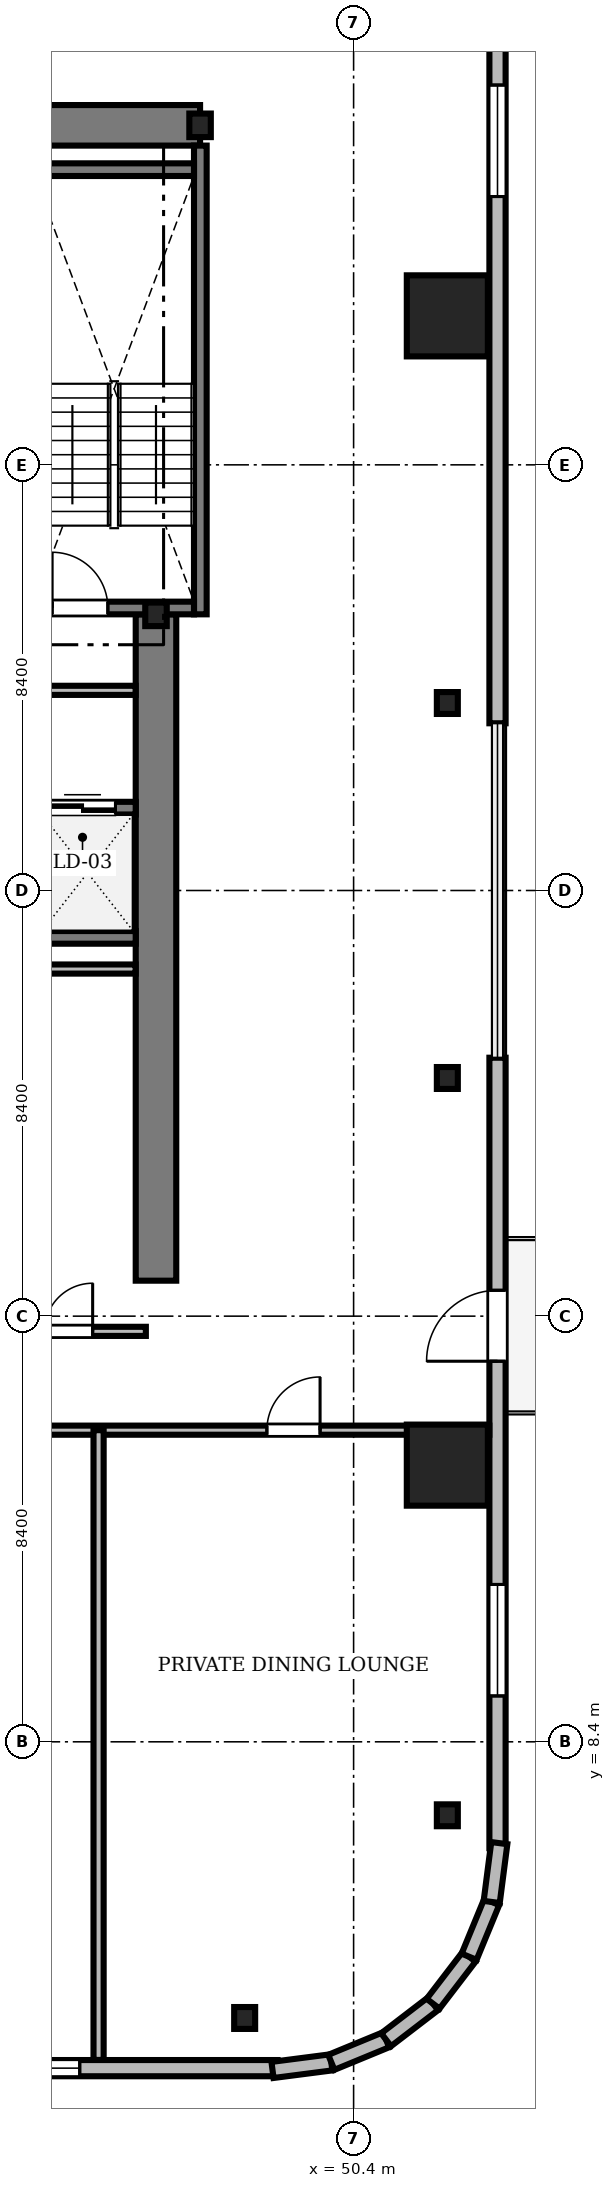
"""IFC4 building model, lengths in metres.
Left out: names, types, materials, properties, quantities, classifications, styles, units other than length and angle.
Written with IfcOpenShell. Run it as: python <this file> out.ifc"""

import sys

from ifc_helpers import new_model, si_unit, direction, frame, frame_2d, origin, origin_2d, place, context, subcontext, project, spatial, rectangle, i_section, extrude, source, transform, mapped, element, fill, save


model = new_model("IFC4")
c1 = context("Model", 3, precision=1e-05, world=origin(), true_north=direction((0.0, 1.0)))
c2 = subcontext(c1, "Body", "Model", "MODEL_VIEW")
j1 = project(units=[si_unit("LENGTHUNIT", "METRE"), si_unit("PLANEANGLEUNIT", "RADIAN")], contexts=[c1])
p1 = place(None, origin())
s1 = spatial("IfcSite", under=j1, at=p1, CompositionType="ELEMENT")
p2 = place(p1, origin())
s2 = spatial("IfcBuilding", under=s1, at=p2, CompositionType="ELEMENT")
p3 = place(p2, frame((0.0, 0.0, 144.6)))
s3 = spatial("IfcBuildingStorey", under=s2, at=p3, CompositionType="ELEMENT", Elevation=144.6)
m1 = source(origin(), c2, "Body", "SweptSolid", [
    extrude(rectangle(XDim=17.52, YDim=0.8, at=frame_2d((8.76, 0.0))), origin(), (0.0, 0.0, 1.0), 3.46),
])
p4 = place(p3, frame((29.85, 40.3, 0.0), z_axis=(0.0, 0.0, 1.0), x_axis=(1.0, 0.0, 0.0)))
e1 = element("IfcWall", 1, at=p4, inside=s3, PredefinedType="SHEAR", context=c2, shape_type="MappedRepresentation", body=[
    mapped(m1, transform((0.0, 0.0, 0.0), scale=1.0)),
])
m2 = source(origin(), c2, "Body", "SweptSolid", [
    extrude(rectangle(XDim=13.15, YDim=0.8, at=frame_2d((6.575, 0.0))), origin(), (0.0, 0.0, 1.0), 3.46),
])
p5 = place(p3, frame((46.5, 17.5, 0.0), z_axis=(0.0, 0.0, 1.0), x_axis=(0.0, 1.0, 0.0)))
e2 = element("IfcWall", 2, at=p5, inside=s3, PredefinedType="SHEAR", context=c2, shape_type="MappedRepresentation", body=[
    mapped(m2, transform((0.0, 0.0, 0.0), scale=1.0)),
])
m3 = source(origin(), c2, "Body", "SweptSolid", [
    extrude(i_section(OverallWidth=0.424, OverallDepth=0.465, WebThickness=0.035, FlangeThickness=0.056, FilletRadius=0.015, at=origin_2d()), origin(), (0.0, 0.0, 1.0), 3.46),
])
for number, where, z_axis, x_axis in (
    (3, (46.5, 30.65, 0.0), (0.0, 0.0, 1.0), (1.0, 0.0, 0.0)),
    (4, (47.37, 40.3, 0.0), (0.0, 0.0, 1.0), (1.0, 0.0, 0.0)),
):
    element("IfcColumn", number, at=place(p3, frame(where, z_axis=z_axis, x_axis=x_axis)), inside=s3, PredefinedType="COLUMN", context=c2, shape_type="MappedRepresentation", body=[
        mapped(m3, transform((0.0, 0.0, 0.0), scale=1.0)),
    ])
m4 = source(origin(), c2, "Body", "SweptSolid", [
    extrude(rectangle(XDim=1.6, YDim=1.6, at=origin_2d()), origin(), (0.0, 0.0, 1.0), 3.46),
])
for number, where, z_axis, x_axis in (
    (5, (52.25, 13.86, 0.0), (0.0, 0.0, 1.0), (1.0, 0.0, 0.0)),
    (6, (52.25, 36.54, 0.0), (0.0, 0.0, 1.0), (1.0, 0.0, 0.0)),
):
    element("IfcColumn", number, at=place(p3, frame(where, z_axis=z_axis, x_axis=x_axis)), inside=s3, PredefinedType="COLUMN", context=c2, shape_type="MappedRepresentation", body=[
        mapped(m4, transform((0.0, 0.0, 0.0), scale=1.0)),
    ])
m5 = source(origin(), c2, "Body", "SweptSolid", [
    extrude(i_section(OverallWidth=0.414, OverallDepth=0.432, WebThickness=0.026, FlangeThickness=0.04, FilletRadius=0.015, at=origin_2d()), origin(), (0.0, 0.0, 1.0), 3.46),
])
for number, where, z_axis, x_axis in (
    (7, (48.25, 2.95, 0.0), (0.0, 0.0, 1.0), (1.0, 0.0, 0.0)),
    (8, (52.25, 6.95, 0.0), (0.0, 0.0, 1.0), (1.0, 0.0, 0.0)),
    (9, (52.25, 21.5, 0.0), (0.0, 0.0, 1.0), (1.0, 0.0, 0.0)),
    (10, (52.25, 28.9, 0.0), (0.0, 0.0, 1.0), (1.0, 0.0, 0.0)),
):
    element("IfcColumn", number, at=place(p3, frame(where, z_axis=z_axis, x_axis=x_axis)), inside=s3, PredefinedType="COLUMN", context=c2, shape_type="MappedRepresentation", body=[
        mapped(m5, transform((0.0, 0.0, 0.0), scale=1.0)),
    ])
m6 = source(origin(), c2, "Body", "SweptSolid", [
    extrude(rectangle(XDim=15.6, YDim=0.32, at=frame_2d((7.8, 0.0))), origin(), (0.0, 0.0, 1.0), 3.46),
])
p6 = place(p3, frame((33.3, 1.96, 0.0), z_axis=(0.0, 0.0, 1.0), x_axis=(1.0, 0.0, 0.0)))
e11 = element("IfcWall", 11, at=p6, inside=s3, PredefinedType="SOLIDWALL", context=c2, shape_type="MappedRepresentation", body=[
    mapped(m6, transform((0.0, 0.0, 0.0), scale=1.0)),
])
m7 = source(origin(), c2, "Body", "SweptSolid", [
    extrude(rectangle(XDim=1.4, YDim=2.3, at=frame_2d((0.7, 1.15))), frame((0.0, 0.17, 0.0), z_axis=(0.0, -1.0, 0.0), x_axis=(1.0, 0.0, 0.0)), (0.0, 0.0, 1.0), 0.34),
])
p7 = place(p6, frame((4.59, 0.0, 0.0)))
e12 = element("IfcOpeningElement", 12, at=p7, cuts=e11, PredefinedType="OPENING", context=c2, shape_type="MappedRepresentation", body=[
    mapped(m7, transform((0.0, 0.0, 0.0), scale=1.0)),
])
m8 = source(origin(), c2, "Body", "SweptSolid", [
    extrude(rectangle(XDim=2.2, YDim=2.4, at=frame_2d((1.1, 1.2))), frame((0.0, 0.17, 0.0), z_axis=(0.0, -1.0, 0.0), x_axis=(1.0, 0.0, 0.0)), (0.0, 0.0, 1.0), 0.34),
])
p8 = place(p6, frame((9.495, 0.0, 0.72)))
e13 = element("IfcOpeningElement", 13, at=p8, cuts=e11, PredefinedType="OPENING", context=c2, shape_type="MappedRepresentation", body=[
    mapped(m8, transform((0.0, 0.0, 0.0), scale=1.0)),
])
p9 = place(p3, frame((53.24, 6.3, 0.0), z_axis=(0.0, 0.0, 1.0), x_axis=(0.0, 1.0, 0.0)))
e14 = element("IfcWall", 14, at=p9, inside=s3, PredefinedType="SOLIDWALL", context=c2, shape_type="MappedRepresentation", body=[
    mapped(m6, transform((0.0, 0.0, 0.0), scale=1.0)),
])
p10 = place(p9, frame((9.61, 0.0, 0.0)))
e15 = element("IfcOpeningElement", 15, at=p10, cuts=e14, PredefinedType="OPENING", context=c2, shape_type="MappedRepresentation", body=[
    mapped(m7, transform((0.0, 0.0, 0.0), scale=1.0)),
])
p11 = place(p9, frame((3.005, 0.0, 0.72)))
e16 = element("IfcOpeningElement", 16, at=p11, cuts=e14, PredefinedType="OPENING", context=c2, shape_type="MappedRepresentation", body=[
    mapped(m8, transform((0.0, 0.0, 0.0), scale=1.0)),
])
m9 = source(origin(), c2, "Body", "SweptSolid", [
    extrude(rectangle(XDim=15.6, YDim=0.32, at=frame_2d((7.8, 0.0))), origin(), (0.0, 0.0, 1.0), 3.46),
])
p12 = place(p3, frame((53.24, 28.5, 0.0), z_axis=(0.0, 0.0, 1.0), x_axis=(0.0, 1.0, 0.0)))
e17 = element("IfcWall", 17, at=p12, inside=s3, PredefinedType="SOLIDWALL", context=c2, shape_type="MappedRepresentation", body=[
    mapped(m9, transform((0.0, 0.0, 0.0), scale=1.0)),
])
p13 = place(p12, frame((10.395, 0.0, 0.72)))
e18 = element("IfcOpeningElement", 18, at=p13, cuts=e17, PredefinedType="OPENING", context=c2, shape_type="MappedRepresentation", body=[
    mapped(m8, transform((0.0, 0.0, 0.0), scale=1.0)),
])
m10 = source(origin(), c2, "Body", "SweptSolid", [
    extrude(rectangle(XDim=1.17, YDim=0.32, at=frame_2d((0.585, 0.0))), origin(), (0.0, 0.0, 1.0), 3.46),
])
p14 = place(p3, frame((48.8, 1.925, 0.0), z_axis=(0.0, 0.0, 1.0), x_axis=(0.991762485493, 0.128090485085, 0.0)))
e19 = element("IfcWall", 19, at=p14, inside=s3, PredefinedType="SOLIDWALL", context=c2, shape_type="MappedRepresentation", body=[
    mapped(m10, transform((0.0, 0.0, 0.0), scale=1.0)),
])
m11 = source(origin(), c2, "Body", "SweptSolid", [
    extrude(rectangle(XDim=1.169, YDim=0.32, at=frame_2d((0.585, 0.0))), origin(), (0.0, 0.0, 1.0), 3.46),
])
p15 = place(p3, frame((49.96, 2.074, 0.0), z_axis=(0.0, 0.0, 1.0), x_axis=(0.924479075121, 0.381232789334, 0.0)))
e20 = element("IfcWall", 20, at=p15, inside=s3, PredefinedType="SOLIDWALL", context=c2, shape_type="MappedRepresentation", body=[
    mapped(m11, transform((0.0, 0.0, 0.0), scale=1.0)),
])
m12 = source(origin(), c2, "Body", "SweptSolid", [
    extrude(rectangle(XDim=1.169, YDim=0.32, at=frame_2d((0.584, 0.0))), origin(), (0.0, 0.0, 1.0), 3.46),
])
p16 = place(p3, frame((51.041, 2.52, 0.0), z_axis=(0.0, 0.0, 1.0), x_axis=(0.793663520347, 0.608356981114, 0.0)))
e21 = element("IfcWall", 21, at=p16, inside=s3, PredefinedType="SOLIDWALL", context=c2, shape_type="MappedRepresentation", body=[
    mapped(m12, transform((0.0, 0.0, 0.0), scale=1.0)),
])
m13 = source(origin(), c2, "Body", "SweptSolid", [
    extrude(rectangle(XDim=1.169, YDim=0.32, at=frame_2d((0.584, 0.0))), origin(), (0.0, 0.0, 1.0), 3.46),
])
for number, where, z_axis, x_axis in (
    (22, (51.969, 3.231, 0.0), (0.0, 0.0, 1.0), (0.608, 0.794, 0.0)),
    (23, (52.68, 4.159, 0.0), (0.0, 0.0, 1.0), (0.381, 0.925, 0.0)),
):
    element("IfcWall", number, at=place(p3, frame(where, z_axis=z_axis, x_axis=x_axis)), inside=s3, PredefinedType="SOLIDWALL", context=c2, shape_type="MappedRepresentation", body=[
        mapped(m13, transform((0.0, 0.0, 0.0), scale=1.0)),
    ])
m14 = source(origin(), c2, "Body", "SweptSolid", [
    extrude(rectangle(XDim=1.171, YDim=0.32, at=frame_2d((0.585, 0.0))), origin(), (0.0, 0.0, 1.0), 3.46),
])
p17 = place(p3, frame((53.125, 5.24, 0.0), z_axis=(0.0, 0.0, 1.0), x_axis=(0.128269133229, 0.991739395941, 0.0)))
e24 = element("IfcWall", 24, at=p17, inside=s3, PredefinedType="SOLIDWALL", context=c2, shape_type="MappedRepresentation", body=[
    mapped(m14, transform((0.0, 0.0, 0.0), scale=1.0)),
])
m15 = source(origin(), c2, "Body", "SweptSolid", [
    extrude(rectangle(XDim=9.25, YDim=0.25, at=frame_2d((4.625, 0.0))), origin(), (0.0, 0.0, 1.0), 3.5),
])
p18 = place(p3, frame((47.375, 30.65, 0.0), z_axis=(0.0, 0.0, 1.0), x_axis=(0.0, 1.0, 0.0)))
e25 = element("IfcWall", 25, at=p18, inside=s3, PredefinedType="SOLIDWALL", context=c2, shape_type="MappedRepresentation", body=[
    mapped(m15, transform((0.0, 0.0, 0.0), scale=1.0)),
])
m16 = source(origin(), c2, "Body", "SweptSolid", [
    extrude(rectangle(XDim=3.15, YDim=0.25, at=frame_2d((1.575, 0.0))), origin(), (0.0, 0.0, 1.0), 3.5),
])
p19 = place(p3, frame((44.1, 39.425, 0.0), z_axis=(0.0, 0.0, 1.0), x_axis=(1.0, 0.0, 0.0)))
e26 = element("IfcWall", 26, at=p19, inside=s3, PredefinedType="SOLIDWALL", context=c2, shape_type="MappedRepresentation", body=[
    mapped(m16, transform((0.0, 0.0, 0.0), scale=1.0)),
])
p20 = place(p3, frame((44.1, 30.775, 0.0), z_axis=(0.0, 0.0, 1.0), x_axis=(1.0, 0.0, 0.0)))
e27 = element("IfcWall", 27, at=p20, inside=s3, PredefinedType="SOLIDWALL", context=c2, shape_type="MappedRepresentation", body=[
    mapped(m16, transform((0.0, 0.0, 0.0), scale=1.0)),
])
m17 = source(origin(), c2, "Body", "SweptSolid", [
    extrude(rectangle(XDim=1.1, YDim=2.2, at=frame_2d((0.55, 1.1))), frame((0.0, 0.135, 0.0), z_axis=(0.0, -1.0, 0.0), x_axis=(1.0, 0.0, 0.0)), (0.0, 0.0, 1.0), 0.27),
])
p21 = place(p20, frame((0.35, 0.0, 0.0)))
e28 = element("IfcOpeningElement", 28, at=p21, cuts=e27, PredefinedType="OPENING", context=c2, shape_type="MappedRepresentation", body=[
    mapped(m17, transform((0.0, 0.0, 0.0), scale=1.0)),
])
m18 = source(origin(), c2, "Body", "SweptSolid", [
    extrude(rectangle(XDim=2.1, YDim=0.25, at=frame_2d((1.05, 0.0))), origin(), (0.0, 0.0, 1.0), 3.46),
])
p22 = place(p3, frame((44.0, 24.275, 0.0), z_axis=(0.0, 0.0, 1.0), x_axis=(1.0, 0.0, 0.0)))
e29 = element("IfcWall", 29, at=p22, inside=s3, PredefinedType="SOLIDWALL", context=c2, shape_type="MappedRepresentation", body=[
    mapped(m18, transform((0.0, 0.0, 0.0), scale=1.0)),
])
p23 = place(p3, frame((44.0, 26.825, 0.0), z_axis=(0.0, 0.0, 1.0), x_axis=(1.0, 0.0, 0.0)))
e30 = element("IfcWall", 30, at=p23, inside=s3, PredefinedType="SOLIDWALL", context=c2, shape_type="MappedRepresentation", body=[
    mapped(m18, transform((0.0, 0.0, 0.0), scale=1.0)),
])
m19 = source(origin(), c2, "Body", "SweptSolid", [
    extrude(rectangle(XDim=1.3, YDim=2.3, at=frame_2d((0.65, 1.15))), frame((0.0, 0.135, 0.0), z_axis=(0.0, -1.0, 0.0), x_axis=(1.0, 0.0, 0.0)), (0.0, 0.0, 1.0), 0.27),
])
p24 = place(p23, frame((0.4, 0.0, 0.0)))
e31 = element("IfcOpeningElement", 31, at=p24, cuts=e30, PredefinedType="OPENING", context=c2, shape_type="MappedRepresentation", body=[
    mapped(m19, transform((0.0, 0.0, 0.0), scale=1.0)),
])
m20 = source(origin(), c2, "Body", "SweptSolid", [
    extrude(rectangle(XDim=46.156, YDim=0.18, at=frame_2d((23.078, 0.0))), origin(), (0.0, 0.0, 1.0), 2.702),
])
p25 = place(p3, frame((6.922, 14.55, 0.0), z_axis=(0.0, 0.0, 1.0), x_axis=(1.0, 0.0, 0.0)))
e32 = element("IfcWall", 32, at=p25, inside=s3, PredefinedType="PARTITIONING", context=c2, shape_type="MappedRepresentation", body=[
    mapped(m20, transform((0.0, 0.0, 0.0), scale=1.0)),
])
m21 = source(origin(), c2, "Body", "SweptSolid", [
    extrude(rectangle(XDim=1.05, YDim=2.2, at=frame_2d((0.525, 1.1))), frame((0.0, 0.1, 0.0), z_axis=(0.0, -1.0, 0.0), x_axis=(1.0, 0.0, 0.0)), (0.0, 0.0, 1.0), 0.2),
])
p26 = place(p25, frame((13.978, 0.0, 0.0)))
e33 = element("IfcOpeningElement", 33, at=p26, cuts=e32, PredefinedType="OPENING", context=c2, shape_type="MappedRepresentation", body=[
    mapped(m21, transform((0.0, 0.0, 0.0), scale=1.0)),
])
p27 = place(p25, frame((17.698, 0.0, 0.0)))
e34 = element("IfcOpeningElement", 34, at=p27, cuts=e32, PredefinedType="OPENING", context=c2, shape_type="MappedRepresentation", body=[
    mapped(m21, transform((0.0, 0.0, 0.0), scale=1.0)),
])
p28 = place(p25, frame((23.477, 0.0, 0.0)))
e35 = element("IfcOpeningElement", 35, at=p28, cuts=e32, PredefinedType="OPENING", context=c2, shape_type="MappedRepresentation", body=[
    mapped(m21, transform((0.0, 0.0, 0.0), scale=1.0)),
])
p29 = place(p25, frame((29.357, 0.0, 0.0)))
e36 = element("IfcOpeningElement", 36, at=p29, cuts=e32, PredefinedType="OPENING", context=c2, shape_type="MappedRepresentation", body=[
    mapped(m21, transform((0.0, 0.0, 0.0), scale=1.0)),
])
p30 = place(p25, frame((35.136, 0.0, 0.0)))
e37 = element("IfcOpeningElement", 37, at=p30, cuts=e32, PredefinedType="OPENING", context=c2, shape_type="MappedRepresentation", body=[
    mapped(m21, transform((0.0, 0.0, 0.0), scale=1.0)),
])
p31 = place(p25, frame((41.766, 0.0, 0.0)))
e38 = element("IfcOpeningElement", 38, at=p31, cuts=e32, PredefinedType="OPENING", context=c2, shape_type="MappedRepresentation", body=[
    mapped(m21, transform((0.0, 0.0, 0.0), scale=1.0)),
])
m22 = source(origin(), c2, "Body", "SweptSolid", [
    extrude(rectangle(XDim=4.548, YDim=0.18, at=frame_2d((2.274, 0.0))), origin(), (0.0, 0.0, 1.0), 3.092),
])
p32 = place(p3, frame((41.55, 29.15, 0.0), z_axis=(0.0, 0.0, 1.0), x_axis=(1.0, 0.0, 0.0)))
e39 = element("IfcWall", 39, at=p32, inside=s3, PredefinedType="PARTITIONING", context=c2, shape_type="MappedRepresentation", body=[
    mapped(m22, transform((0.0, 0.0, 0.0), scale=1.0)),
])
m23 = source(origin(), c2, "Body", "SweptSolid", [
    extrude(rectangle(XDim=1.2, YDim=2.2, at=frame_2d((0.6, 1.1))), frame((0.0, 0.1, 0.0), z_axis=(0.0, -1.0, 0.0), x_axis=(1.0, 0.0, 0.0)), (0.0, 0.0, 1.0), 0.2),
])
p33 = place(p32, frame((1.6, 0.0, 0.0)))
e40 = element("IfcOpeningElement", 40, at=p33, cuts=e39, PredefinedType="OPENING", context=c2, shape_type="MappedRepresentation", body=[
    mapped(m23, transform((0.0, 0.0, 0.0), scale=1.0)),
])
m24 = source(origin(), c2, "Body", "SweptSolid", [
    extrude(rectangle(XDim=4.7, YDim=0.18, at=frame_2d((2.35, 0.0))), origin(), (0.0, 0.0, 1.0), 2.852),
])
p34 = place(p3, frame((41.6, 16.5, 0.0), z_axis=(0.0, 0.0, 1.0), x_axis=(1.0, 0.0, 0.0)))
e41 = element("IfcWall", 41, at=p34, inside=s3, PredefinedType="PARTITIONING", context=c2, shape_type="MappedRepresentation", body=[
    mapped(m24, transform((0.0, 0.0, 0.0), scale=1.0)),
])
m25 = source(origin(), c2, "Body", "SweptSolid", [
    extrude(rectangle(XDim=0.95, YDim=2.15, at=frame_2d((0.475, 1.075))), frame((0.0, 0.1, 0.0), z_axis=(0.0, -1.0, 0.0), x_axis=(1.0, 0.0, 0.0)), (0.0, 0.0, 1.0), 0.2),
])
p35 = place(p34, frame((0.35, 0.0, 0.0)))
e42 = element("IfcOpeningElement", 42, at=p35, cuts=e41, PredefinedType="OPENING", context=c2, shape_type="MappedRepresentation", body=[
    mapped(m25, transform((0.0, 0.0, 0.0), scale=1.0)),
])
p36 = place(p34, frame((2.7, 0.0, 0.0)))
e43 = element("IfcOpeningElement", 43, at=p36, cuts=e41, PredefinedType="OPENING", context=c2, shape_type="MappedRepresentation", body=[
    mapped(m25, transform((0.0, 0.0, 0.0), scale=1.0)),
])
m26 = source(origin(), c2, "Body", "SweptSolid", [
    extrude(rectangle(XDim=12.428, YDim=0.2, at=frame_2d((6.214, 0.0))), origin(), (0.0, 0.0, 1.0), 2.702),
])
p37 = place(p3, frame((45.367, 2.122, 0.0), z_axis=(0.0, 0.0, 1.0), x_axis=(0.0, 1.0, 0.0)))
e44 = element("IfcWall", 44, at=p37, inside=s3, PredefinedType="PARTITIONING", context=c2, shape_type="MappedRepresentation", body=[
    mapped(m26, transform((0.0, 0.0, 0.0), scale=1.0)),
])
m27 = source(origin(), c2, "Body", "SweptSolid", [
    extrude(rectangle(XDim=4.498, YDim=0.18, at=frame_2d((2.249, 0.0))), origin(), (0.0, 0.0, 1.0), 3.46),
])
p38 = place(p3, frame((41.6, 23.65, 0.0), z_axis=(0.0, 0.0, 1.0), x_axis=(1.0, 0.0, 0.0)))
e45 = element("IfcWall", 45, at=p38, inside=s3, PredefinedType="PARTITIONING", context=c2, shape_type="MappedRepresentation", body=[
    mapped(m27, transform((0.0, 0.0, 0.0), scale=1.0)),
])
m28 = source(origin(), c2, "Body", "SweptSolid", [
    extrude(rectangle(XDim=2.2, YDim=2.4, at=frame_2d((1.1, 1.2))), frame((0.0, 0.03, 0.0), z_axis=(0.0, -1.0, 0.0), x_axis=(1.0, 0.0, 0.0)), (0.0, 0.0, 1.0), 0.06),
])
p39 = place(p8, origin())
e46 = element("IfcWindow", 46, at=p39, inside=s3, PartitioningType="SINGLE_PANEL", PredefinedType="WINDOW", context=c2, shape_type="MappedRepresentation", body=[
    mapped(m28, transform((0.0, 0.0, 0.0), scale=1.0)),
])
fill(e13, e46)
m29 = source(origin(), c2, "Body", "SweptSolid", [
    extrude(rectangle(XDim=1.4, YDim=2.3, at=frame_2d((0.7, 1.15))), frame((0.0, 0.025, 0.0), z_axis=(0.0, -1.0, 0.0), x_axis=(1.0, 0.0, 0.0)), (0.0, 0.0, 1.0), 0.05),
])
p40 = place(p10, frame((1.4, 0.0, 0.0), z_axis=(0.0, 0.0, 1.0), x_axis=(-1.0, 0.0, 0.0)))
e47 = element("IfcDoor", 47, at=p40, inside=s3, OperationType="DOUBLE_DOOR_SLIDING", PredefinedType="DOOR", context=c2, shape_type="MappedRepresentation", body=[
    mapped(m29, transform((0.0, 0.0, 0.0), scale=1.0)),
])
fill(e15, e47)
p41 = place(p11, origin())
e48 = element("IfcWindow", 48, at=p41, inside=s3, PartitioningType="SINGLE_PANEL", PredefinedType="WINDOW", context=c2, shape_type="MappedRepresentation", body=[
    mapped(m28, transform((0.0, 0.0, 0.0), scale=1.0)),
])
fill(e16, e48)
p42 = place(p13, origin())
e49 = element("IfcWindow", 49, at=p42, inside=s3, PartitioningType="SINGLE_PANEL", PredefinedType="WINDOW", context=c2, shape_type="MappedRepresentation", body=[
    mapped(m28, transform((0.0, 0.0, 0.0), scale=1.0)),
])
fill(e18, e49)
m30 = source(origin(), c2, "Body", "SweptSolid", [
    extrude(rectangle(XDim=1.1, YDim=2.2, at=frame_2d((0.55, 1.1))), frame((0.0, 0.025, 0.0), z_axis=(0.0, -1.0, 0.0), x_axis=(1.0, 0.0, 0.0)), (0.0, 0.0, 1.0), 0.05),
])
p43 = place(p21, origin())
e50 = element("IfcDoor", 50, at=p43, inside=s3, OperationType="SINGLE_SWING_LEFT", PredefinedType="DOOR", context=c2, shape_type="MappedRepresentation", body=[
    mapped(m30, transform((0.0, 0.0, 0.0), scale=1.0)),
])
fill(e28, e50)
m31 = source(origin(), c2, "Body", "SweptSolid", [
    extrude(rectangle(XDim=1.3, YDim=2.3, at=frame_2d((0.65, 1.15))), frame((0.0, 0.025, 0.0), z_axis=(0.0, -1.0, 0.0), x_axis=(1.0, 0.0, 0.0)), (0.0, 0.0, 1.0), 0.05),
])
p44 = place(p24, origin())
e51 = element("IfcDoor", 51, at=p44, inside=s3, OperationType="DOUBLE_DOOR_SLIDING", PredefinedType="DOOR", context=c2, shape_type="MappedRepresentation", body=[
    mapped(m31, transform((0.0, 0.0, 0.0), scale=1.0)),
])
fill(e31, e51)
m32 = source(origin(), c2, "Body", "SweptSolid", [
    extrude(rectangle(XDim=1.05, YDim=2.2, at=frame_2d((0.525, 1.1))), frame((0.0, 0.025, 0.0), z_axis=(0.0, -1.0, 0.0), x_axis=(1.0, 0.0, 0.0)), (0.0, 0.0, 1.0), 0.05),
])
p45 = place(p31, origin())
e52 = element("IfcDoor", 52, at=p45, inside=s3, OperationType="SINGLE_SWING_RIGHT", PredefinedType="DOOR", context=c2, shape_type="MappedRepresentation", body=[
    mapped(m32, transform((0.0, 0.0, 0.0), scale=1.0)),
])
fill(e38, e52)
m33 = source(origin(), c2, "Body", "SweptSolid", [
    extrude(rectangle(XDim=0.95, YDim=2.15, at=frame_2d((0.475, 1.075))), frame((0.0, 0.025, 0.0), z_axis=(0.0, -1.0, 0.0), x_axis=(1.0, 0.0, 0.0)), (0.0, 0.0, 1.0), 0.05),
])
p46 = place(p36, origin())
e53 = element("IfcDoor", 53, at=p46, inside=s3, OperationType="SINGLE_SWING_RIGHT", PredefinedType="DOOR", context=c2, shape_type="MappedRepresentation", body=[
    mapped(m33, transform((0.0, 0.0, 0.0), scale=1.0)),
])
fill(e43, e53)
save(model, sys.argv[1])
